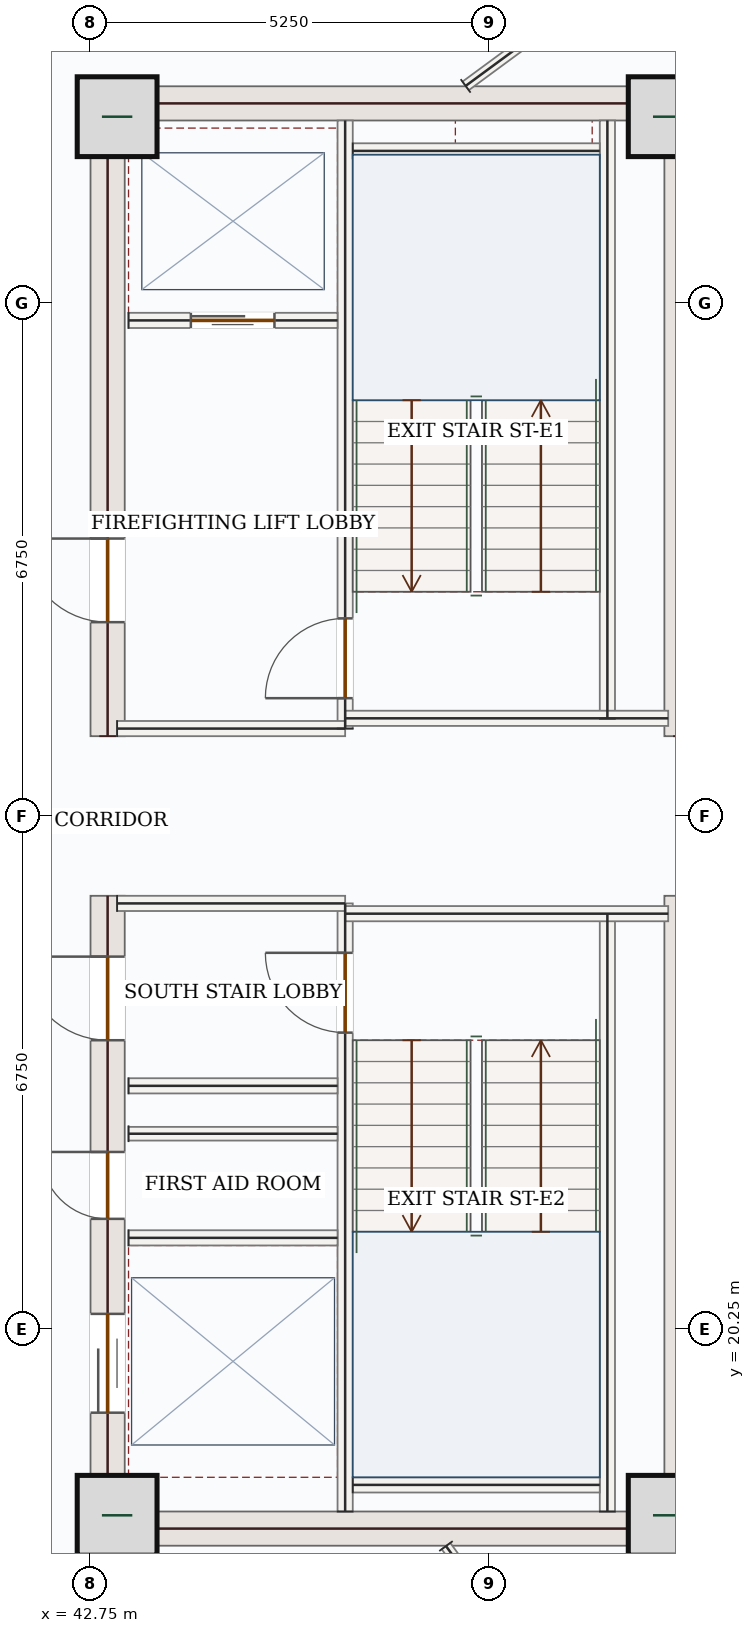
"""IFC4 building model, lengths in metres.
Left out: names, types, materials, properties, quantities, classifications, styles, units other than length and angle.
Written with IfcOpenShell. Run it as: python <this file> out.ifc"""

import sys

from ifc_helpers import new_model, si_unit, direction, frame, frame_2d, origin, origin_2d, place, context, subcontext, project, spatial, rectangle, extrude, source, transform, mapped, element, fill, save


model = new_model("IFC4")
c1 = context("Model", 3, precision=1e-05, world=origin(), true_north=direction((0.0, 1.0)))
c2 = subcontext(c1, "Body", "Model", "MODEL_VIEW")
j1 = project(units=[si_unit("LENGTHUNIT", "METRE"), si_unit("PLANEANGLEUNIT", "RADIAN")], contexts=[c1])
p1 = place(None, origin())
s1 = spatial("IfcSite", under=j1, at=p1, CompositionType="ELEMENT")
p2 = place(p1, origin())
s2 = spatial("IfcBuilding", under=s1, at=p2, CompositionType="ELEMENT")
p3 = place(p2, frame((0.0, 0.0, 272.85)))
s3 = spatial("IfcBuildingStorey", under=s2, at=p3, CompositionType="ELEMENT", Elevation=272.85)
p4 = place(p3, frame((42.975, 17.4, 0.0), z_axis=(0.0, 0.0, 1.0), x_axis=(0.0, 1.0, 0.0)))
e1 = element("IfcWall", 1, at=p4, inside=s3, PredefinedType="SHEAR", context=c2, shape_type="SweptSolid", body=[
    extrude(rectangle(XDim=8.55, YDim=0.45, at=frame_2d((4.275, 0.0))), origin(), (0.0, 0.0, 1.0), 3.5),
])
p5 = place(p4, frame((6.65, 0.0, 0.0)))
e2 = element("IfcOpeningElement", 2, at=p5, cuts=e1, PredefinedType="OPENING", context=c2, shape_type="SweptSolid", body=[
    extrude(rectangle(XDim=1.1, YDim=2.2, at=frame_2d((0.55, 1.1))), frame((0.0, 0.235, 0.0), z_axis=(0.0, -1.0, 0.0), x_axis=(1.0, 0.0, 0.0)), (0.0, 0.0, 1.0), 0.47),
])
p6 = place(p4, frame((1.75, 0.0, 0.0)))
e3 = element("IfcOpeningElement", 3, at=p6, cuts=e1, PredefinedType="OPENING", context=c2, shape_type="SweptSolid", body=[
    extrude(rectangle(XDim=1.3, YDim=2.2, at=frame_2d((0.65, 1.1))), frame((0.0, 0.235, 0.0), z_axis=(0.0, -1.0, 0.0), x_axis=(1.0, 0.0, 0.0)), (0.0, 0.0, 1.0), 0.47),
])
p7 = place(p4, frame((4.3, 0.0, 0.0)))
e4 = element("IfcOpeningElement", 4, at=p7, cuts=e1, PredefinedType="OPENING", context=c2, shape_type="SweptSolid", body=[
    extrude(rectangle(XDim=0.88, YDim=2.1, at=frame_2d((0.44, 1.05))), frame((0.0, 0.235, 0.0), z_axis=(0.0, -1.0, 0.0), x_axis=(1.0, 0.0, 0.0)), (0.0, 0.0, 1.0), 0.47),
])
p8 = place(p3, frame((42.975, 28.05, 0.0), z_axis=(0.0, 0.0, 1.0), x_axis=(0.0, 1.0, 0.0)))
e5 = element("IfcWall", 5, at=p8, inside=s3, PredefinedType="SHEAR", context=c2, shape_type="SweptSolid", body=[
    extrude(rectangle(XDim=8.55, YDim=0.45, at=frame_2d((4.275, 0.0))), origin(), (0.0, 0.0, 1.0), 3.5),
])
p9 = place(p8, frame((1.5, 0.0, 0.0)))
e6 = element("IfcOpeningElement", 6, at=p9, cuts=e5, PredefinedType="OPENING", context=c2, shape_type="SweptSolid", body=[
    extrude(rectangle(XDim=1.1, YDim=2.2, at=frame_2d((0.55, 1.1))), frame((0.0, 0.235, 0.0), z_axis=(0.0, -1.0, 0.0), x_axis=(1.0, 0.0, 0.0)), (0.0, 0.0, 1.0), 0.47),
])
m1 = source(origin(), c2, "Body", "SweptSolid", [
    extrude(rectangle(XDim=8.55, YDim=0.45, at=frame_2d((4.275, 0.0))), origin(), (0.0, 0.0, 1.0), 3.5),
])
for number, where, z_axis, x_axis in (
    (7, (50.525, 17.4, 0.0), (0.0, 0.0, 1.0), (0.0, 1.0, 0.0)),
    (8, (50.525, 28.05, 0.0), (0.0, 0.0, 1.0), (0.0, 1.0, 0.0)),
):
    element("IfcWall", number, at=place(p3, frame(where, z_axis=z_axis, x_axis=x_axis)), inside=s3, PredefinedType="SHEAR", context=c2, shape_type="MappedRepresentation", body=[
        mapped(m1, transform((0.0, 0.0, 0.0), x_axis=(1.0, 0.0, 0.0), y_axis=(0.0, 1.0, 0.0), z_axis=(0.0, 0.0, 1.0), scale=1.0)),
    ])
m2 = source(origin(), c2, "Body", "SweptSolid", [
    extrude(rectangle(XDim=7.1, YDim=0.45, at=frame_2d((3.55, 0.0))), origin(), (0.0, 0.0, 1.0), 3.5),
])
for number, where, z_axis, x_axis in (
    (9, (43.2, 17.625, 0.0), (0.0, 0.0, 1.0), (1.0, 0.0, 0.0)),
    (10, (43.2, 36.375, 0.0), (0.0, 0.0, 1.0), (1.0, 0.0, 0.0)),
):
    element("IfcWall", number, at=place(p3, frame(where, z_axis=z_axis, x_axis=x_axis)), inside=s3, PredefinedType="SHEAR", context=c2, shape_type="MappedRepresentation", body=[
        mapped(m2, transform((0.0, 0.0, 0.0), x_axis=(1.0, 0.0, 0.0), y_axis=(0.0, 1.0, 0.0), z_axis=(0.0, 0.0, 1.0), scale=1.0)),
    ])
m3 = source(origin(), c2, "Body", "SweptSolid", [
    extrude(rectangle(XDim=1.05, YDim=1.05, at=origin_2d()), origin(), (0.0, 0.0, 1.0), 3.75),
])
for number, where, z_axis, x_axis in (
    (11, (43.1, 17.8, 0.0), (0.0, 0.0, 1.0), (1.0, 0.0, 0.0)),
    (12, (50.35, 17.8, 0.0), (0.0, 0.0, 1.0), (1.0, 0.0, 0.0)),
    (13, (43.1, 36.2, 0.0), (0.0, 0.0, 1.0), (1.0, 0.0, 0.0)),
    (14, (50.35, 36.2, 0.0), (0.0, 0.0, 1.0), (1.0, 0.0, 0.0)),
):
    element("IfcColumn", number, at=place(p3, frame(where, z_axis=z_axis, x_axis=x_axis)), inside=s3, PredefinedType="COLUMN", context=c2, shape_type="MappedRepresentation", body=[
        mapped(m3, transform((0.0, 0.0, 0.0), x_axis=(1.0, 0.0, 0.0), y_axis=(0.0, 1.0, 0.0), z_axis=(0.0, 0.0, 1.0), scale=1.0)),
    ])
m4 = source(origin(), c2, "Body", "SweptSolid", [
    extrude(rectangle(XDim=7.87, YDim=0.2, at=frame_2d((3.935, 0.0))), origin(), (0.0, 0.0, 1.0), 3.5),
])
for number, where, z_axis, x_axis in (
    (15, (49.55, 17.85, 0.0), (0.0, 0.0, 1.0), (0.0, 1.0, 0.0)),
    (16, (49.55, 28.28, 0.0), (0.0, 0.0, 1.0), (0.0, 1.0, 0.0)),
):
    element("IfcWall", number, at=place(p3, frame(where, z_axis=z_axis, x_axis=x_axis)), inside=s3, PredefinedType="SOLIDWALL", context=c2, shape_type="MappedRepresentation", body=[
        mapped(m4, transform((0.0, 0.0, 0.0), x_axis=(1.0, 0.0, 0.0), y_axis=(0.0, 1.0, 0.0), z_axis=(0.0, 0.0, 1.0), scale=1.0)),
    ])
p10 = place(p3, frame((46.1, 17.85, 0.0), z_axis=(0.0, 0.0, 1.0), x_axis=(0.0, 1.0, 0.0)))
e17 = element("IfcWall", 17, at=p10, inside=s3, PredefinedType="SOLIDWALL", context=c2, shape_type="SweptSolid", body=[
    extrude(rectangle(XDim=8.0, YDim=0.2, at=frame_2d((4.0, 0.0))), origin(), (0.0, 0.0, 1.0), 3.5),
])
p11 = place(p10, frame((6.3, 0.0, 0.0)))
e18 = element("IfcOpeningElement", 18, at=p11, cuts=e17, PredefinedType="OPENING", context=c2, shape_type="SweptSolid", body=[
    extrude(rectangle(XDim=1.05, YDim=2.15, at=frame_2d((0.525, 1.075))), frame((0.0, 0.11, 0.0), z_axis=(0.0, -1.0, 0.0), x_axis=(1.0, 0.0, 0.0)), (0.0, 0.0, 1.0), 0.22),
])
p12 = place(p3, frame((46.1, 28.15, 0.0), z_axis=(0.0, 0.0, 1.0), x_axis=(0.0, 1.0, 0.0)))
e19 = element("IfcWall", 19, at=p12, inside=s3, PredefinedType="SOLIDWALL", context=c2, shape_type="SweptSolid", body=[
    extrude(rectangle(XDim=8.0, YDim=0.2, at=frame_2d((4.0, 0.0))), origin(), (0.0, 0.0, 1.0), 3.5),
])
p13 = place(p12, frame((0.4, 0.0, 0.0)))
e20 = element("IfcOpeningElement", 20, at=p13, cuts=e19, PredefinedType="OPENING", context=c2, shape_type="SweptSolid", body=[
    extrude(rectangle(XDim=1.05, YDim=2.15, at=frame_2d((0.525, 1.075))), frame((0.0, 0.11, 0.0), z_axis=(0.0, -1.0, 0.0), x_axis=(1.0, 0.0, 0.0)), (0.0, 0.0, 1.0), 0.22),
])
m5 = source(origin(), c2, "Body", "SweptSolid", [
    extrude(rectangle(XDim=3.0, YDim=0.2, at=frame_2d((1.5, 0.0))), origin(), (0.0, 0.0, 1.0), 3.5),
])
p14 = place(p3, frame((43.1, 25.85, 0.0), z_axis=(0.0, 0.0, 1.0), x_axis=(1.0, 0.0, 0.0)))
e21 = element("IfcWall", 21, at=p14, inside=s3, PredefinedType="SOLIDWALL", context=c2, shape_type="MappedRepresentation", body=[
    mapped(m5, transform((0.0, 0.0, 0.0), x_axis=(1.0, 0.0, 0.0), y_axis=(0.0, 1.0, 0.0), z_axis=(0.0, 0.0, 1.0), scale=1.0)),
])
m6 = source(origin(), c2, "Body", "SweptSolid", [
    extrude(rectangle(XDim=4.25, YDim=0.2, at=frame_2d((2.125, 0.0))), origin(), (0.0, 0.0, 1.0), 3.5),
])
p15 = place(p3, frame((46.1, 25.715, 0.0), z_axis=(0.0, 0.0, 1.0), x_axis=(1.0, 0.0, 0.0)))
e22 = element("IfcWall", 22, at=p15, inside=s3, PredefinedType="SOLIDWALL", context=c2, shape_type="MappedRepresentation", body=[
    mapped(m6, transform((0.0, 0.0, 0.0), x_axis=(1.0, 0.0, 0.0), y_axis=(0.0, 1.0, 0.0), z_axis=(0.0, 0.0, 1.0), scale=1.0)),
])
p16 = place(p3, frame((43.1, 28.15, 0.0), z_axis=(0.0, 0.0, 1.0), x_axis=(1.0, 0.0, 0.0)))
e23 = element("IfcWall", 23, at=p16, inside=s3, PredefinedType="SOLIDWALL", context=c2, shape_type="MappedRepresentation", body=[
    mapped(m5, transform((0.0, 0.0, 0.0), x_axis=(1.0, 0.0, 0.0), y_axis=(0.0, 1.0, 0.0), z_axis=(0.0, 0.0, 1.0), scale=1.0)),
])
p17 = place(p3, frame((46.1, 28.285, 0.0), z_axis=(0.0, 0.0, 1.0), x_axis=(1.0, 0.0, 0.0)))
e24 = element("IfcWall", 24, at=p17, inside=s3, PredefinedType="SOLIDWALL", context=c2, shape_type="MappedRepresentation", body=[
    mapped(m6, transform((0.0, 0.0, 0.0), x_axis=(1.0, 0.0, 0.0), y_axis=(0.0, 1.0, 0.0), z_axis=(0.0, 0.0, 1.0), scale=1.0)),
])
m7 = source(origin(), c2, "Body", "SweptSolid", [
    extrude(rectangle(XDim=3.25, YDim=0.2, at=frame_2d((1.625, 0.0))), origin(), (0.0, 0.0, 1.0), 3.5),
])
for number, where, z_axis, x_axis in (
    (25, (46.2, 35.75, 0.0), (0.0, 0.0, 1.0), (1.0, 0.0, 0.0)),
    (26, (46.2, 18.2, 0.0), (0.0, 0.0, 1.0), (1.0, 0.0, 0.0)),
):
    element("IfcWall", number, at=place(p3, frame(where, z_axis=z_axis, x_axis=x_axis)), inside=s3, PredefinedType="SOLIDWALL", context=c2, shape_type="MappedRepresentation", body=[
        mapped(m7, transform((0.0, 0.0, 0.0), x_axis=(1.0, 0.0, 0.0), y_axis=(0.0, 1.0, 0.0), z_axis=(0.0, 0.0, 1.0), scale=1.0)),
    ])
p18 = place(p3, frame((43.25, 33.52, 0.0), z_axis=(0.0, 0.0, 1.0), x_axis=(1.0, 0.0, 0.0)))
e27 = element("IfcWall", 27, at=p18, inside=s3, PredefinedType="SOLIDWALL", context=c2, shape_type="SweptSolid", body=[
    extrude(rectangle(XDim=2.75, YDim=0.2, at=frame_2d((1.375, 0.0))), origin(), (0.0, 0.0, 1.0), 3.5),
])
p19 = place(p18, frame((0.82, 0.0, 0.0)))
e28 = element("IfcOpeningElement", 28, at=p19, cuts=e27, PredefinedType="OPENING", context=c2, shape_type="SweptSolid", body=[
    extrude(rectangle(XDim=1.1, YDim=2.15, at=frame_2d((0.55, 1.075))), frame((0.0, 0.11, 0.0), z_axis=(0.0, -1.0, 0.0), x_axis=(1.0, 0.0, 0.0)), (0.0, 0.0, 1.0), 0.22),
])
m8 = source(origin(), c2, "Body", "SweptSolid", [
    extrude(rectangle(XDim=2.75, YDim=0.2, at=frame_2d((1.375, 0.0))), origin(), (0.0, 0.0, 1.0), 3.5),
])
for number, where, z_axis, x_axis in (
    (29, (43.25, 23.45, 0.0), (0.0, 0.0, 1.0), (1.0, 0.0, 0.0)),
    (30, (43.25, 21.45, 0.0), (0.0, 0.0, 1.0), (1.0, 0.0, 0.0)),
):
    element("IfcWall", number, at=place(p3, frame(where, z_axis=z_axis, x_axis=x_axis)), inside=s3, PredefinedType="SOLIDWALL", context=c2, shape_type="MappedRepresentation", body=[
        mapped(m8, transform((0.0, 0.0, 0.0), x_axis=(1.0, 0.0, 0.0), y_axis=(0.0, 1.0, 0.0), z_axis=(0.0, 0.0, 1.0), scale=1.0)),
    ])
m9 = source(origin(), c2, "Body", "SweptSolid", [
    extrude(rectangle(XDim=2.75, YDim=0.18, at=frame_2d((1.375, 0.0))), origin(), (0.0, 0.0, 1.0), 3.5),
])
p20 = place(p3, frame((43.25, 22.82, 0.0), z_axis=(0.0, 0.0, 1.0), x_axis=(1.0, 0.0, 0.0)))
e31 = element("IfcWall", 31, at=p20, inside=s3, PredefinedType="PARTITIONING", context=c2, shape_type="MappedRepresentation", body=[
    mapped(m9, transform((0.0, 0.0, 0.0), x_axis=(1.0, 0.0, 0.0), y_axis=(0.0, 1.0, 0.0), z_axis=(0.0, 0.0, 1.0), scale=1.0)),
])
m10 = source(origin(), c2, "Body", "SweptSolid", [
    extrude(rectangle(XDim=2.013, YDim=0.14, at=frame_2d((1.006, 0.0))), origin(), (0.0, 0.0, 1.0), 3.5),
])
p21 = place(p3, frame((47.427, 17.395, 0.0), z_axis=(0.0, 0.0, 1.0), x_axis=(0.592698341467, -0.80542453155, 0.0)))
e32 = element("IfcWall", 32, at=p21, inside=s3, PredefinedType="PARTITIONING", context=c2, shape_type="MappedRepresentation", body=[
    mapped(m10, transform((0.0, 0.0, 0.0), x_axis=(1.0, 0.0, 0.0), y_axis=(0.0, 1.0, 0.0), z_axis=(0.0, 0.0, 1.0), scale=1.0)),
])
m11 = source(origin(), c2, "Body", "SweptSolid", [
    extrude(rectangle(XDim=5.37, YDim=0.14, at=frame_2d((2.685, 0.0))), origin(), (0.0, 0.0, 1.0), 3.5),
])
p22 = place(p3, frame((47.685, 36.605, 0.0), z_axis=(0.0, 0.0, 1.0), x_axis=(0.805412248971, 0.592715032041, 0.0)))
e33 = element("IfcWall", 33, at=p22, inside=s3, PredefinedType="PARTITIONING", context=c2, shape_type="MappedRepresentation", body=[
    mapped(m11, transform((0.0, 0.0, 0.0), x_axis=(1.0, 0.0, 0.0), y_axis=(0.0, 1.0, 0.0), z_axis=(0.0, 0.0, 1.0), scale=1.0)),
])
m12 = source(origin(), c2, "Body", "SweptSolid", [
    extrude(rectangle(XDim=1.05, YDim=2.15, at=frame_2d((0.525, 1.075))), frame((0.0, 0.025, 0.0), z_axis=(0.0, -1.0, 0.0), x_axis=(1.0, 0.0, 0.0)), (0.0, 0.0, 1.0), 0.05),
])
p23 = place(p13, origin())
e34 = element("IfcDoor", 34, at=p23, inside=s3, OperationType="SINGLE_SWING_LEFT", PredefinedType="DOOR", context=c2, shape_type="MappedRepresentation", body=[
    mapped(m12, transform((0.0, 0.0, 0.0), x_axis=(1.0, 0.0, 0.0), y_axis=(0.0, 1.0, 0.0), z_axis=(0.0, 0.0, 1.0), scale=1.0)),
])
fill(e20, e34)
p24 = place(p11, origin())
e35 = element("IfcDoor", 35, at=p24, inside=s3, OperationType="SINGLE_SWING_RIGHT", PredefinedType="DOOR", context=c2, shape_type="MappedRepresentation", body=[
    mapped(m12, transform((0.0, 0.0, 0.0), x_axis=(1.0, 0.0, 0.0), y_axis=(0.0, 1.0, 0.0), z_axis=(0.0, 0.0, 1.0), scale=1.0)),
])
fill(e18, e35)
m13 = source(origin(), c2, "Body", "SweptSolid", [
    extrude(rectangle(XDim=1.1, YDim=2.15, at=frame_2d((0.55, 1.075))), frame((0.0, 0.025, 0.0), z_axis=(0.0, -1.0, 0.0), x_axis=(1.0, 0.0, 0.0)), (0.0, 0.0, 1.0), 0.05),
])
p25 = place(p19, origin())
e36 = element("IfcDoor", 36, at=p25, inside=s3, OperationType="DOUBLE_DOOR_SLIDING", PredefinedType="DOOR", context=c2, shape_type="MappedRepresentation", body=[
    mapped(m13, transform((0.0, 0.0, 0.0), x_axis=(1.0, 0.0, 0.0), y_axis=(0.0, 1.0, 0.0), z_axis=(0.0, 0.0, 1.0), scale=1.0)),
])
fill(e28, e36)
m14 = source(origin(), c2, "Body", "SweptSolid", [
    extrude(rectangle(XDim=1.1, YDim=2.2, at=frame_2d((0.55, 1.1))), frame((0.0, 0.025, 0.0), z_axis=(0.0, -1.0, 0.0), x_axis=(1.0, 0.0, 0.0)), (0.0, 0.0, 1.0), 0.05),
])
p26 = place(p9, origin())
e37 = element("IfcDoor", 37, at=p26, inside=s3, OperationType="SINGLE_SWING_RIGHT", PredefinedType="DOOR", context=c2, shape_type="MappedRepresentation", body=[
    mapped(m14, transform((0.0, 0.0, 0.0), x_axis=(1.0, 0.0, 0.0), y_axis=(0.0, 1.0, 0.0), z_axis=(0.0, 0.0, 1.0), scale=1.0)),
])
fill(e6, e37)
p27 = place(p5, origin())
e38 = element("IfcDoor", 38, at=p27, inside=s3, OperationType="SINGLE_SWING_RIGHT", PredefinedType="DOOR", context=c2, shape_type="MappedRepresentation", body=[
    mapped(m14, transform((0.0, 0.0, 0.0), x_axis=(1.0, 0.0, 0.0), y_axis=(0.0, 1.0, 0.0), z_axis=(0.0, 0.0, 1.0), scale=1.0)),
])
fill(e2, e38)
m15 = source(origin(), c2, "Body", "SweptSolid", [
    extrude(rectangle(XDim=1.3, YDim=2.2, at=frame_2d((0.65, 1.1))), frame((0.0, 0.025, 0.0), z_axis=(0.0, -1.0, 0.0), x_axis=(1.0, 0.0, 0.0)), (0.0, 0.0, 1.0), 0.05),
])
p28 = place(p6, origin())
e39 = element("IfcDoor", 39, at=p28, inside=s3, OperationType="DOUBLE_DOOR_SLIDING", PredefinedType="DOOR", context=c2, shape_type="MappedRepresentation", body=[
    mapped(m15, transform((0.0, 0.0, 0.0), x_axis=(1.0, 0.0, 0.0), y_axis=(0.0, 1.0, 0.0), z_axis=(0.0, 0.0, 1.0), scale=1.0)),
])
fill(e3, e39)
m16 = source(origin(), c2, "Body", "SweptSolid", [
    extrude(rectangle(XDim=0.88, YDim=2.1, at=frame_2d((0.44, 1.05))), frame((0.0, 0.025, 0.0), z_axis=(0.0, -1.0, 0.0), x_axis=(1.0, 0.0, 0.0)), (0.0, 0.0, 1.0), 0.05),
])
p29 = place(p7, origin())
e40 = element("IfcDoor", 40, at=p29, inside=s3, OperationType="SINGLE_SWING_RIGHT", PredefinedType="DOOR", context=c2, shape_type="MappedRepresentation", body=[
    mapped(m16, transform((0.0, 0.0, 0.0), x_axis=(1.0, 0.0, 0.0), y_axis=(0.0, 1.0, 0.0), z_axis=(0.0, 0.0, 1.0), scale=1.0)),
])
fill(e4, e40)
save(model, sys.argv[1])
